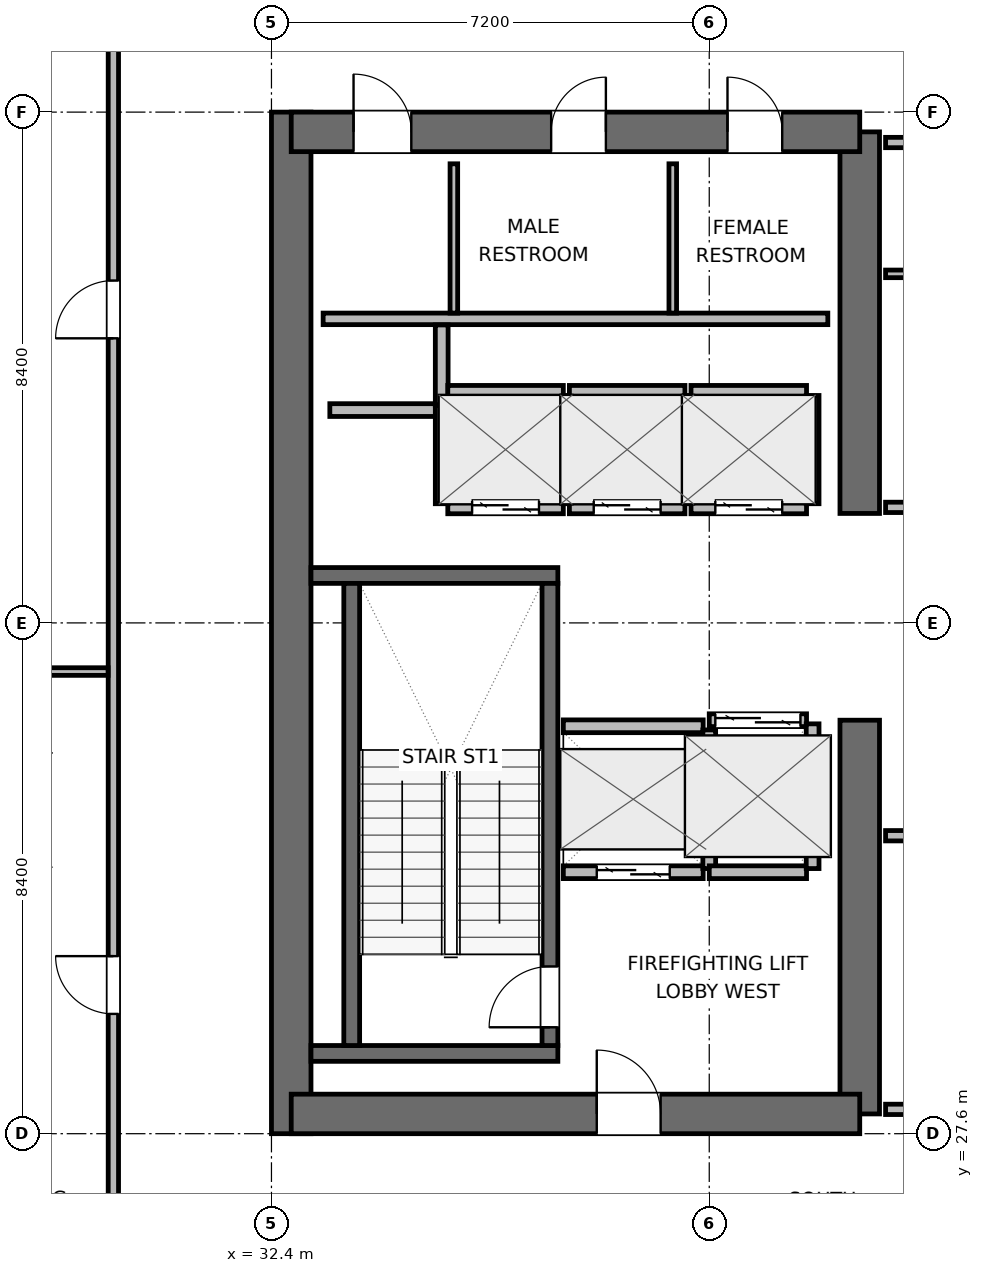
"""IFC4 building model, lengths in metres.
Left out: names, types, materials, properties, quantities, classifications, styles, units other than length and angle.
Written with IfcOpenShell. Run it as: python <this file> out.ifc"""

import sys

from ifc_helpers import new_model, si_unit, direction, frame, frame_2d, origin, place, context, subcontext, project, spatial, rectangle, extrude, element, fill, save


model = new_model("IFC4")
c1 = context("Model", 3, precision=1e-05, world=origin(), true_north=direction((0.0, 1.0)))
c2 = subcontext(c1, "Body", "Model", "MODEL_VIEW")
j1 = project(units=[si_unit("LENGTHUNIT", "METRE"), si_unit("PLANEANGLEUNIT", "RADIAN")], contexts=[c1])
p1 = place(None, origin())
s1 = spatial("IfcSite", under=j1, at=p1, CompositionType="ELEMENT")
p2 = place(p1, origin())
s2 = spatial("IfcBuilding", under=s1, at=p2, CompositionType="ELEMENT")
p3 = place(p2, frame((0.0, 0.0, 214.8)))
s3 = spatial("IfcBuildingStorey", under=s2, at=p3, CompositionType="ELEMENT", Elevation=214.8)
p4 = place(p3, frame((32.725, 27.6, 0.0), z_axis=(0.0, 0.0, 1.0), x_axis=(0.0, 1.0, 0.0)))
e1 = element("IfcWall", 1, at=p4, inside=s3, PredefinedType="SHEAR", context=c2, shape_type="SweptSolid", body=[
    extrude(rectangle(XDim=16.8, YDim=0.65, at=frame_2d((8.4, 0.0))), origin(), (0.0, 0.0, 1.0), 4.5),
])
p5 = place(p3, frame((42.075, 27.925, 0.0), z_axis=(0.0, 0.0, 1.0), x_axis=(0.0, 1.0, 0.0)))
e2 = element("IfcWall", 2, at=p5, inside=s3, PredefinedType="SHEAR", context=c2, shape_type="SweptSolid", body=[
    extrude(rectangle(XDim=6.475, YDim=0.65, at=frame_2d((3.237, 0.0))), origin(), (0.0, 0.0, 1.0), 4.5),
])
p6 = place(p3, frame((42.075, 37.8, 0.0), z_axis=(0.0, 0.0, 1.0), x_axis=(0.0, 1.0, 0.0)))
e3 = element("IfcWall", 3, at=p6, inside=s3, PredefinedType="SHEAR", context=c2, shape_type="SweptSolid", body=[
    extrude(rectangle(XDim=6.275, YDim=0.65, at=frame_2d((3.137, 0.0))), origin(), (0.0, 0.0, 1.0), 4.5),
])
p7 = place(p3, frame((32.725, 27.925, 0.0), z_axis=(0.0, 0.0, 1.0), x_axis=(1.0, 0.0, 0.0)))
e4 = element("IfcWall", 4, at=p7, inside=s3, PredefinedType="SHEAR", context=c2, shape_type="SweptSolid", body=[
    extrude(rectangle(XDim=9.35, YDim=0.65, at=frame_2d((4.675, 0.0))), origin(), (0.0, 0.0, 1.0), 4.5),
])
p8 = place(p7, frame((5.025, 0.0, 0.0)))
e5 = element("IfcOpeningElement", 5, at=p8, cuts=e4, PredefinedType="OPENING", context=c2, shape_type="SweptSolid", body=[
    extrude(rectangle(XDim=1.05, YDim=2.04, at=frame_2d((0.525, 1.02))), frame((0.0, 0.335, 0.0), z_axis=(0.0, -1.0, 0.0), x_axis=(1.0, 0.0, 0.0)), (0.0, 0.0, 1.0), 0.67),
])
p9 = place(p3, frame((32.725, 44.075, 0.0), z_axis=(0.0, 0.0, 1.0), x_axis=(1.0, 0.0, 0.0)))
e6 = element("IfcWall", 6, at=p9, inside=s3, PredefinedType="SHEAR", context=c2, shape_type="SweptSolid", body=[
    extrude(rectangle(XDim=9.35, YDim=0.65, at=frame_2d((4.675, 0.0))), origin(), (0.0, 0.0, 1.0), 4.5),
])
p10 = place(p9, frame((1.025, 0.0, 0.0)))
e7 = element("IfcOpeningElement", 7, at=p10, cuts=e6, PredefinedType="OPENING", context=c2, shape_type="SweptSolid", body=[
    extrude(rectangle(XDim=0.95, YDim=2.04, at=frame_2d((0.475, 1.02))), frame((0.0, 0.335, 0.0), z_axis=(0.0, -1.0, 0.0), x_axis=(1.0, 0.0, 0.0)), (0.0, 0.0, 1.0), 0.67),
])
p11 = place(p9, frame((4.275, 0.0, 0.0)))
e8 = element("IfcOpeningElement", 8, at=p11, cuts=e6, PredefinedType="OPENING", context=c2, shape_type="SweptSolid", body=[
    extrude(rectangle(XDim=0.9, YDim=2.02, at=frame_2d((0.45, 1.01))), frame((0.0, 0.335, 0.0), z_axis=(0.0, -1.0, 0.0), x_axis=(1.0, 0.0, 0.0)), (0.0, 0.0, 1.0), 0.67),
])
p12 = place(p9, frame((7.175, 0.0, 0.0)))
e9 = element("IfcOpeningElement", 9, at=p12, cuts=e6, PredefinedType="OPENING", context=c2, shape_type="SweptSolid", body=[
    extrude(rectangle(XDim=0.9, YDim=2.02, at=frame_2d((0.45, 1.01))), frame((0.0, 0.335, 0.0), z_axis=(0.0, -1.0, 0.0), x_axis=(1.0, 0.0, 0.0)), (0.0, 0.0, 1.0), 0.67),
])
for number, where, z_axis, x_axis in (
    (10, (33.05, 28.92, 0.0), (0.0, 0.0, 1.0), (1.0, 0.0, 0.0)),
    (11, (33.05, 36.78, 0.0), (0.0, 0.0, 1.0), (1.0, 0.0, 0.0)),
):
    element("IfcWall", number, at=place(p3, frame(where, z_axis=z_axis, x_axis=x_axis)), inside=s3, PredefinedType="SHEAR", context=c2, shape_type="SweptSolid", body=[
        extrude(rectangle(XDim=4.06, YDim=0.26, at=frame_2d((2.03, 0.0))), origin(), (0.0, 0.0, 1.0), 4.5),
    ])
p13 = place(p3, frame((33.72, 29.05, 0.0), z_axis=(0.0, 0.0, 1.0), x_axis=(0.0, 1.0, 0.0)))
e12 = element("IfcWall", 12, at=p13, inside=s3, PredefinedType="SHEAR", context=c2, shape_type="SweptSolid", body=[
    extrude(rectangle(XDim=7.6, YDim=0.26, at=frame_2d((3.8, 0.0))), origin(), (0.0, 0.0, 1.0), 4.5),
])
p14 = place(p3, frame((36.98, 29.05, 0.0), z_axis=(0.0, 0.0, 1.0), x_axis=(0.0, 1.0, 0.0)))
e13 = element("IfcWall", 13, at=p14, inside=s3, PredefinedType="SHEAR", context=c2, shape_type="SweptSolid", body=[
    extrude(rectangle(XDim=7.6, YDim=0.26, at=frame_2d((3.8, 0.0))), origin(), (0.0, 0.0, 1.0), 4.5),
])
p15 = place(p14, frame((0.3, 0.0, 0.0)))
e14 = element("IfcOpeningElement", 14, at=p15, cuts=e13, PredefinedType="OPENING", context=c2, shape_type="SweptSolid", body=[
    extrude(rectangle(XDim=1.0, YDim=2.04, at=frame_2d((0.5, 1.02))), frame((0.0, 0.14, 0.0), z_axis=(0.0, -1.0, 0.0), x_axis=(1.0, 0.0, 0.0)), (0.0, 0.0, 1.0), 0.28),
])
p16 = place(p3, frame((33.25, 41.0, 0.0), z_axis=(0.0, 0.0, 1.0), x_axis=(1.0, 0.0, 0.0)))
e15 = element("IfcWall", 15, at=p16, inside=s3, PredefinedType="PLUMBINGWALL", context=c2, shape_type="SweptSolid", body=[
    extrude(rectangle(XDim=8.3, YDim=0.19, at=frame_2d((4.15, 0.0))), origin(), (0.0, 0.0, 1.0), 4.28),
])
for number, where, z_axis, x_axis in (
    (16, (35.4, 41.095, 0.0), (0.0, 0.0, 1.0), (0.0, 1.0, 0.0)),
    (17, (39.0, 41.095, 0.0), (0.0, 0.0, 1.0), (0.0, 1.0, 0.0)),
):
    element("IfcWall", number, at=place(p3, frame(where, z_axis=z_axis, x_axis=x_axis)), inside=s3, PredefinedType="PARTITIONING", context=c2, shape_type="SweptSolid", body=[
        extrude(rectangle(XDim=2.455, YDim=0.125, at=frame_2d((1.228, 0.0))), origin(), (0.0, 0.0, 1.0), 4.28),
    ])
p17 = place(p3, frame((33.36, 39.5, 0.0), z_axis=(0.0, 0.0, 1.0), x_axis=(1.0, 0.0, 0.0)))
e18 = element("IfcWall", 18, at=p17, inside=s3, PredefinedType="PARTITIONING", context=c2, shape_type="SweptSolid", body=[
    extrude(rectangle(XDim=1.86, YDim=0.21, at=frame_2d((0.93, 0.0))), origin(), (0.0, 0.0, 1.0), 4.28),
])
p18 = place(p3, frame((35.2, 39.58, 0.0), z_axis=(0.0, 0.0, 1.0), x_axis=(0.0, 1.0, 0.0)))
e19 = element("IfcWall", 19, at=p18, inside=s3, PredefinedType="PARTITIONING", context=c2, shape_type="SweptSolid", body=[
    extrude(rectangle(XDim=1.32, YDim=0.21, at=frame_2d((0.66, 0.0))), origin(), (0.0, 0.0, 1.0), 4.28),
])
p19 = place(p3, frame((37.2, 31.9, 0.0), z_axis=(0.0, 0.0, 1.0), x_axis=(1.0, 0.0, 0.0)))
e20 = element("IfcWall", 20, at=p19, inside=s3, PredefinedType="PARTITIONING", context=c2, shape_type="SweptSolid", body=[
    extrude(rectangle(XDim=2.3, YDim=0.21, at=frame_2d((1.15, 0.0))), origin(), (0.0, 0.0, 1.0), 4.28),
])
p20 = place(p19, frame((0.55, 0.0, 0.0)))
e21 = element("IfcOpeningElement", 21, at=p20, cuts=e20, PredefinedType="OPENING", context=c2, shape_type="SweptSolid", body=[
    extrude(rectangle(XDim=1.2, YDim=2.04, at=frame_2d((0.6, 1.02))), frame((0.0, 0.115, 0.0), z_axis=(0.0, -1.0, 0.0), x_axis=(1.0, 0.0, 0.0)), (0.0, 0.0, 1.0), 0.23),
])
p21 = place(p3, frame((37.2, 34.3, 0.0), z_axis=(0.0, 0.0, 1.0), x_axis=(1.0, 0.0, 0.0)))
e22 = element("IfcWall", 22, at=p21, inside=s3, PredefinedType="PARTITIONING", context=c2, shape_type="SweptSolid", body=[
    extrude(rectangle(XDim=2.3, YDim=0.21, at=frame_2d((1.15, 0.0))), origin(), (0.0, 0.0, 1.0), 4.28),
])
p22 = place(p3, frame((39.6, 31.96, 0.0), z_axis=(0.0, 0.0, 1.0), x_axis=(0.0, 1.0, 0.0)))
e23 = element("IfcWall", 23, at=p22, inside=s3, PredefinedType="PARTITIONING", context=c2, shape_type="SweptSolid", body=[
    extrude(rectangle(XDim=2.28, YDim=0.21, at=frame_2d((1.14, 0.0))), origin(), (0.0, 0.0, 1.0), 4.28),
])
p23 = place(p3, frame((39.6, 34.4, 0.0), z_axis=(0.0, 0.0, 1.0), x_axis=(1.0, 0.0, 0.0)))
e24 = element("IfcWall", 24, at=p23, inside=s3, PredefinedType="PARTITIONING", context=c2, shape_type="SweptSolid", body=[
    extrude(rectangle(XDim=1.6, YDim=0.21, at=frame_2d((0.8, 0.0))), origin(), (0.0, 0.0, 1.0), 4.28),
])
p24 = place(p23, frame((0.1, 0.0, 0.0)))
e25 = element("IfcOpeningElement", 25, at=p24, cuts=e24, PredefinedType="OPENING", context=c2, shape_type="SweptSolid", body=[
    extrude(rectangle(XDim=1.4, YDim=2.06, at=frame_2d((0.7, 1.03))), frame((0.0, 0.115, 0.0), z_axis=(0.0, -1.0, 0.0), x_axis=(1.0, 0.0, 0.0)), (0.0, 0.0, 1.0), 0.23),
])
p25 = place(p3, frame((39.6, 31.9, 0.0), z_axis=(0.0, 0.0, 1.0), x_axis=(1.0, 0.0, 0.0)))
e26 = element("IfcWall", 26, at=p25, inside=s3, PredefinedType="PARTITIONING", context=c2, shape_type="SweptSolid", body=[
    extrude(rectangle(XDim=1.6, YDim=0.21, at=frame_2d((0.8, 0.0))), origin(), (0.0, 0.0, 1.0), 4.28),
])
p26 = place(p3, frame((41.3, 31.96, 0.0), z_axis=(0.0, 0.0, 1.0), x_axis=(0.0, 1.0, 0.0)))
e27 = element("IfcWall", 27, at=p26, inside=s3, PredefinedType="PARTITIONING", context=c2, shape_type="SweptSolid", body=[
    extrude(rectangle(XDim=2.38, YDim=0.21, at=frame_2d((1.19, 0.0))), origin(), (0.0, 0.0, 1.0), 4.28),
])
p27 = place(p3, frame((35.3, 37.9, 0.0), z_axis=(0.0, 0.0, 1.0), x_axis=(1.0, 0.0, 0.0)))
e28 = element("IfcWall", 28, at=p27, inside=s3, PredefinedType="PARTITIONING", context=c2, shape_type="SweptSolid", body=[
    extrude(rectangle(XDim=1.9, YDim=0.21, at=frame_2d((0.95, 0.0))), origin(), (0.0, 0.0, 1.0), 4.28),
])
p28 = place(p27, frame((0.4, 0.0, 0.0)))
e29 = element("IfcOpeningElement", 29, at=p28, cuts=e28, PredefinedType="OPENING", context=c2, shape_type="SweptSolid", body=[
    extrude(rectangle(XDim=1.1, YDim=2.04, at=frame_2d((0.55, 1.02))), frame((0.0, 0.115, 0.0), z_axis=(0.0, -1.0, 0.0), x_axis=(1.0, 0.0, 0.0)), (0.0, 0.0, 1.0), 0.23),
])
p29 = place(p3, frame((35.3, 39.8, 0.0), z_axis=(0.0, 0.0, 1.0), x_axis=(1.0, 0.0, 0.0)))
e30 = element("IfcWall", 30, at=p29, inside=s3, PredefinedType="PARTITIONING", context=c2, shape_type="SweptSolid", body=[
    extrude(rectangle(XDim=1.9, YDim=0.21, at=frame_2d((0.95, 0.0))), origin(), (0.0, 0.0, 1.0), 4.28),
])
p30 = place(p3, frame((35.2, 37.96, 0.0), z_axis=(0.0, 0.0, 1.0), x_axis=(0.0, 1.0, 0.0)))
e31 = element("IfcWall", 31, at=p30, inside=s3, PredefinedType="PARTITIONING", context=c2, shape_type="SweptSolid", body=[
    extrude(rectangle(XDim=1.62, YDim=0.21, at=frame_2d((0.81, 0.0))), origin(), (0.0, 0.0, 1.0), 4.28),
])
p31 = place(p3, frame((37.3, 37.96, 0.0), z_axis=(0.0, 0.0, 1.0), x_axis=(0.0, 1.0, 0.0)))
e32 = element("IfcWall", 32, at=p31, inside=s3, PredefinedType="PARTITIONING", context=c2, shape_type="SweptSolid", body=[
    extrude(rectangle(XDim=1.78, YDim=0.21, at=frame_2d((0.89, 0.0))), origin(), (0.0, 0.0, 1.0), 4.28),
])
p32 = place(p3, frame((37.3, 37.9, 0.0), z_axis=(0.0, 0.0, 1.0), x_axis=(1.0, 0.0, 0.0)))
e33 = element("IfcWall", 33, at=p32, inside=s3, PredefinedType="PARTITIONING", context=c2, shape_type="SweptSolid", body=[
    extrude(rectangle(XDim=1.9, YDim=0.21, at=frame_2d((0.95, 0.0))), origin(), (0.0, 0.0, 1.0), 4.28),
])
p33 = place(p32, frame((0.4, 0.0, 0.0)))
e34 = element("IfcOpeningElement", 34, at=p33, cuts=e33, PredefinedType="OPENING", context=c2, shape_type="SweptSolid", body=[
    extrude(rectangle(XDim=1.1, YDim=2.04, at=frame_2d((0.55, 1.02))), frame((0.0, 0.115, 0.0), z_axis=(0.0, -1.0, 0.0), x_axis=(1.0, 0.0, 0.0)), (0.0, 0.0, 1.0), 0.23),
])
p34 = place(p3, frame((37.3, 39.8, 0.0), z_axis=(0.0, 0.0, 1.0), x_axis=(1.0, 0.0, 0.0)))
e35 = element("IfcWall", 35, at=p34, inside=s3, PredefinedType="PARTITIONING", context=c2, shape_type="SweptSolid", body=[
    extrude(rectangle(XDim=1.9, YDim=0.21, at=frame_2d((0.95, 0.0))), origin(), (0.0, 0.0, 1.0), 4.28),
])
p35 = place(p3, frame((39.3, 37.96, 0.0), z_axis=(0.0, 0.0, 1.0), x_axis=(0.0, 1.0, 0.0)))
e36 = element("IfcWall", 36, at=p35, inside=s3, PredefinedType="PARTITIONING", context=c2, shape_type="SweptSolid", body=[
    extrude(rectangle(XDim=1.78, YDim=0.21, at=frame_2d((0.89, 0.0))), origin(), (0.0, 0.0, 1.0), 4.28),
])
p36 = place(p3, frame((39.3, 37.9, 0.0), z_axis=(0.0, 0.0, 1.0), x_axis=(1.0, 0.0, 0.0)))
e37 = element("IfcWall", 37, at=p36, inside=s3, PredefinedType="PARTITIONING", context=c2, shape_type="SweptSolid", body=[
    extrude(rectangle(XDim=1.9, YDim=0.21, at=frame_2d((0.95, 0.0))), origin(), (0.0, 0.0, 1.0), 4.28),
])
p37 = place(p36, frame((0.4, 0.0, 0.0)))
e38 = element("IfcOpeningElement", 38, at=p37, cuts=e37, PredefinedType="OPENING", context=c2, shape_type="SweptSolid", body=[
    extrude(rectangle(XDim=1.1, YDim=2.04, at=frame_2d((0.55, 1.02))), frame((0.0, 0.115, 0.0), z_axis=(0.0, -1.0, 0.0), x_axis=(1.0, 0.0, 0.0)), (0.0, 0.0, 1.0), 0.23),
])
p38 = place(p3, frame((39.3, 39.8, 0.0), z_axis=(0.0, 0.0, 1.0), x_axis=(1.0, 0.0, 0.0)))
e39 = element("IfcWall", 39, at=p38, inside=s3, PredefinedType="PARTITIONING", context=c2, shape_type="SweptSolid", body=[
    extrude(rectangle(XDim=1.9, YDim=0.21, at=frame_2d((0.95, 0.0))), origin(), (0.0, 0.0, 1.0), 4.28),
])
p39 = place(p3, frame((41.3, 37.96, 0.0), z_axis=(0.0, 0.0, 1.0), x_axis=(0.0, 1.0, 0.0)))
e40 = element("IfcWall", 40, at=p39, inside=s3, PredefinedType="PARTITIONING", context=c2, shape_type="SweptSolid", body=[
    extrude(rectangle(XDim=1.78, YDim=0.21, at=frame_2d((0.89, 0.0))), origin(), (0.0, 0.0, 1.0), 4.28),
])
p40 = place(p3, frame((42.5, 28.0, 0.0), z_axis=(0.0, 0.0, 1.0), x_axis=(1.0, 0.0, 0.0)))
e41 = element("IfcWall", 41, at=p40, inside=s3, PredefinedType="PARTITIONING", context=c2, shape_type="SweptSolid", body=[
    extrude(rectangle(XDim=4.213, YDim=0.17, at=frame_2d((2.106, 0.0))), origin(), (0.0, 0.0, 1.0), 3.365),
])
p41 = place(p3, frame((42.5, 32.5, 0.0), z_axis=(0.0, 0.0, 1.0), x_axis=(1.0, 0.0, 0.0)))
e42 = element("IfcWall", 42, at=p41, inside=s3, PredefinedType="PARTITIONING", context=c2, shape_type="SweptSolid", body=[
    extrude(rectangle(XDim=1.3, YDim=0.17, at=frame_2d((0.65, 0.0))), origin(), (0.0, 0.0, 1.0), 4.28),
])
p42 = place(p3, frame((42.5, 37.9, 0.0), z_axis=(0.0, 0.0, 1.0), x_axis=(1.0, 0.0, 0.0)))
e43 = element("IfcWall", 43, at=p42, inside=s3, PredefinedType="PARTITIONING", context=c2, shape_type="SweptSolid", body=[
    extrude(rectangle(XDim=4.213, YDim=0.17, at=frame_2d((2.106, 0.0))), origin(), (0.0, 0.0, 1.0), 4.28),
])
p43 = place(p3, frame((42.5, 43.9, 0.0), z_axis=(0.0, 0.0, 1.0), x_axis=(1.0, 0.0, 0.0)))
e44 = element("IfcWall", 44, at=p43, inside=s3, PredefinedType="PARTITIONING", context=c2, shape_type="SweptSolid", body=[
    extrude(rectangle(XDim=4.213, YDim=0.17, at=frame_2d((2.106, 0.0))), origin(), (0.0, 0.0, 1.0), 3.365),
])
p44 = place(p3, frame((42.5, 41.74, 0.0), z_axis=(0.0, 0.0, 1.0), x_axis=(1.0, 0.0, 0.0)))
e45 = element("IfcWall", 45, at=p44, inside=s3, PredefinedType="PARTITIONING", context=c2, shape_type="SweptSolid", body=[
    extrude(rectangle(XDim=4.213, YDim=0.125, at=frame_2d((2.106, 0.0))), origin(), (0.0, 0.0, 1.0), 4.28),
])
p45 = place(p3, frame((29.8, 24.977, 0.0), z_axis=(0.0, 0.0, 1.0), x_axis=(0.0, 1.0, 0.0)))
e46 = element("IfcWall", 46, at=p45, inside=s3, PredefinedType="PARTITIONING", context=c2, shape_type="SweptSolid", body=[
    extrude(rectangle(XDim=22.046, YDim=0.17, at=frame_2d((11.023, 0.0))), origin(), (0.0, 0.0, 1.0), 4.28),
])
p46 = place(p45, frame((4.593, 0.0, 0.0)))
e47 = element("IfcOpeningElement", 47, at=p46, cuts=e46, PredefinedType="OPENING", context=c2, shape_type="SweptSolid", body=[
    extrude(rectangle(XDim=0.95, YDim=2.04, at=frame_2d((0.475, 1.02))), frame((0.0, 0.095, 0.0), z_axis=(0.0, -1.0, 0.0), x_axis=(1.0, 0.0, 0.0)), (0.0, 0.0, 1.0), 0.19),
])
p47 = place(p45, frame((15.703, 0.0, 0.0)))
e48 = element("IfcOpeningElement", 48, at=p47, cuts=e46, PredefinedType="OPENING", context=c2, shape_type="SweptSolid", body=[
    extrude(rectangle(XDim=0.95, YDim=2.04, at=frame_2d((0.475, 1.02))), frame((0.0, 0.095, 0.0), z_axis=(0.0, -1.0, 0.0), x_axis=(1.0, 0.0, 0.0)), (0.0, 0.0, 1.0), 0.19),
])
p48 = place(p3, frame((25.445, 35.2, 0.0), z_axis=(0.0, 0.0, 1.0), x_axis=(1.0, 0.0, 0.0)))
e49 = element("IfcWall", 49, at=p48, inside=s3, PredefinedType="PARTITIONING", context=c2, shape_type="SweptSolid", body=[
    extrude(rectangle(XDim=4.268, YDim=0.125, at=frame_2d((2.134, 0.0))), origin(), (0.0, 0.0, 1.0), 4.28),
])
p49 = place(p15, origin())
e50 = element("IfcDoor", 50, at=p49, inside=s3, OperationType="SINGLE_SWING_LEFT", PredefinedType="DOOR", context=c2, shape_type="SweptSolid", body=[
    extrude(rectangle(XDim=1.0, YDim=2.04, at=frame_2d((0.5, 1.02))), frame((0.0, 0.025, 0.0), z_axis=(0.0, -1.0, 0.0), x_axis=(1.0, 0.0, 0.0)), (0.0, 0.0, 1.0), 0.05),
])
fill(e14, e50)
p50 = place(p20, origin())
e51 = element("IfcDoor", 51, at=p50, inside=s3, OperationType="DOUBLE_DOOR_SLIDING", PredefinedType="DOOR", context=c2, shape_type="SweptSolid", body=[
    extrude(rectangle(XDim=1.2, YDim=2.04, at=frame_2d((0.6, 1.02))), frame((0.0, 0.025, 0.0), z_axis=(0.0, -1.0, 0.0), x_axis=(1.0, 0.0, 0.0)), (0.0, 0.0, 1.0), 0.05),
])
fill(e21, e51)
p51 = place(p24, origin())
e52 = element("IfcDoor", 52, at=p51, inside=s3, OperationType="DOUBLE_DOOR_SLIDING", PredefinedType="DOOR", context=c2, shape_type="SweptSolid", body=[
    extrude(rectangle(XDim=1.4, YDim=2.06, at=frame_2d((0.7, 1.03))), frame((0.0, 0.025, 0.0), z_axis=(0.0, -1.0, 0.0), x_axis=(1.0, 0.0, 0.0)), (0.0, 0.0, 1.0), 0.05),
])
fill(e25, e52)
p52 = place(p28, origin())
e53 = element("IfcDoor", 53, at=p52, inside=s3, OperationType="DOUBLE_DOOR_SLIDING", PredefinedType="DOOR", context=c2, shape_type="SweptSolid", body=[
    extrude(rectangle(XDim=1.1, YDim=2.04, at=frame_2d((0.55, 1.02))), frame((0.0, 0.025, 0.0), z_axis=(0.0, -1.0, 0.0), x_axis=(1.0, 0.0, 0.0)), (0.0, 0.0, 1.0), 0.05),
])
fill(e29, e53)
p53 = place(p33, origin())
e54 = element("IfcDoor", 54, at=p53, inside=s3, OperationType="DOUBLE_DOOR_SLIDING", PredefinedType="DOOR", context=c2, shape_type="SweptSolid", body=[
    extrude(rectangle(XDim=1.1, YDim=2.04, at=frame_2d((0.55, 1.02))), frame((0.0, 0.025, 0.0), z_axis=(0.0, -1.0, 0.0), x_axis=(1.0, 0.0, 0.0)), (0.0, 0.0, 1.0), 0.05),
])
fill(e34, e54)
p54 = place(p37, origin())
e55 = element("IfcDoor", 55, at=p54, inside=s3, OperationType="DOUBLE_DOOR_SLIDING", PredefinedType="DOOR", context=c2, shape_type="SweptSolid", body=[
    extrude(rectangle(XDim=1.1, YDim=2.04, at=frame_2d((0.55, 1.02))), frame((0.0, 0.025, 0.0), z_axis=(0.0, -1.0, 0.0), x_axis=(1.0, 0.0, 0.0)), (0.0, 0.0, 1.0), 0.05),
])
fill(e38, e55)
p55 = place(p8, origin())
e56 = element("IfcDoor", 56, at=p55, inside=s3, OperationType="SINGLE_SWING_LEFT", PredefinedType="DOOR", context=c2, shape_type="SweptSolid", body=[
    extrude(rectangle(XDim=1.05, YDim=2.04, at=frame_2d((0.525, 1.02))), frame((0.0, 0.025, 0.0), z_axis=(0.0, -1.0, 0.0), x_axis=(1.0, 0.0, 0.0)), (0.0, 0.0, 1.0), 0.05),
])
fill(e5, e56)
p56 = place(p10, origin())
e57 = element("IfcDoor", 57, at=p56, inside=s3, OperationType="SINGLE_SWING_LEFT", PredefinedType="DOOR", context=c2, shape_type="SweptSolid", body=[
    extrude(rectangle(XDim=0.95, YDim=2.04, at=frame_2d((0.475, 1.02))), frame((0.0, 0.025, 0.0), z_axis=(0.0, -1.0, 0.0), x_axis=(1.0, 0.0, 0.0)), (0.0, 0.0, 1.0), 0.05),
])
fill(e7, e57)
p57 = place(p11, origin())
e58 = element("IfcDoor", 58, at=p57, inside=s3, OperationType="SINGLE_SWING_RIGHT", PredefinedType="DOOR", context=c2, shape_type="SweptSolid", body=[
    extrude(rectangle(XDim=0.9, YDim=2.02, at=frame_2d((0.45, 1.01))), frame((0.0, 0.025, 0.0), z_axis=(0.0, -1.0, 0.0), x_axis=(1.0, 0.0, 0.0)), (0.0, 0.0, 1.0), 0.05),
])
fill(e8, e58)
p58 = place(p12, origin())
e59 = element("IfcDoor", 59, at=p58, inside=s3, OperationType="SINGLE_SWING_LEFT", PredefinedType="DOOR", context=c2, shape_type="SweptSolid", body=[
    extrude(rectangle(XDim=0.9, YDim=2.02, at=frame_2d((0.45, 1.01))), frame((0.0, 0.025, 0.0), z_axis=(0.0, -1.0, 0.0), x_axis=(1.0, 0.0, 0.0)), (0.0, 0.0, 1.0), 0.05),
])
fill(e9, e59)
p59 = place(p46, origin())
e60 = element("IfcDoor", 60, at=p59, inside=s3, OperationType="SINGLE_SWING_RIGHT", PredefinedType="DOOR", context=c2, shape_type="SweptSolid", body=[
    extrude(rectangle(XDim=0.95, YDim=2.04, at=frame_2d((0.475, 1.02))), frame((0.0, 0.025, 0.0), z_axis=(0.0, -1.0, 0.0), x_axis=(1.0, 0.0, 0.0)), (0.0, 0.0, 1.0), 0.05),
])
fill(e47, e60)
p60 = place(p47, origin())
e61 = element("IfcDoor", 61, at=p60, inside=s3, OperationType="SINGLE_SWING_LEFT", PredefinedType="DOOR", context=c2, shape_type="SweptSolid", body=[
    extrude(rectangle(XDim=0.95, YDim=2.04, at=frame_2d((0.475, 1.02))), frame((0.0, 0.025, 0.0), z_axis=(0.0, -1.0, 0.0), x_axis=(1.0, 0.0, 0.0)), (0.0, 0.0, 1.0), 0.05),
])
fill(e48, e61)
save(model, sys.argv[1])
